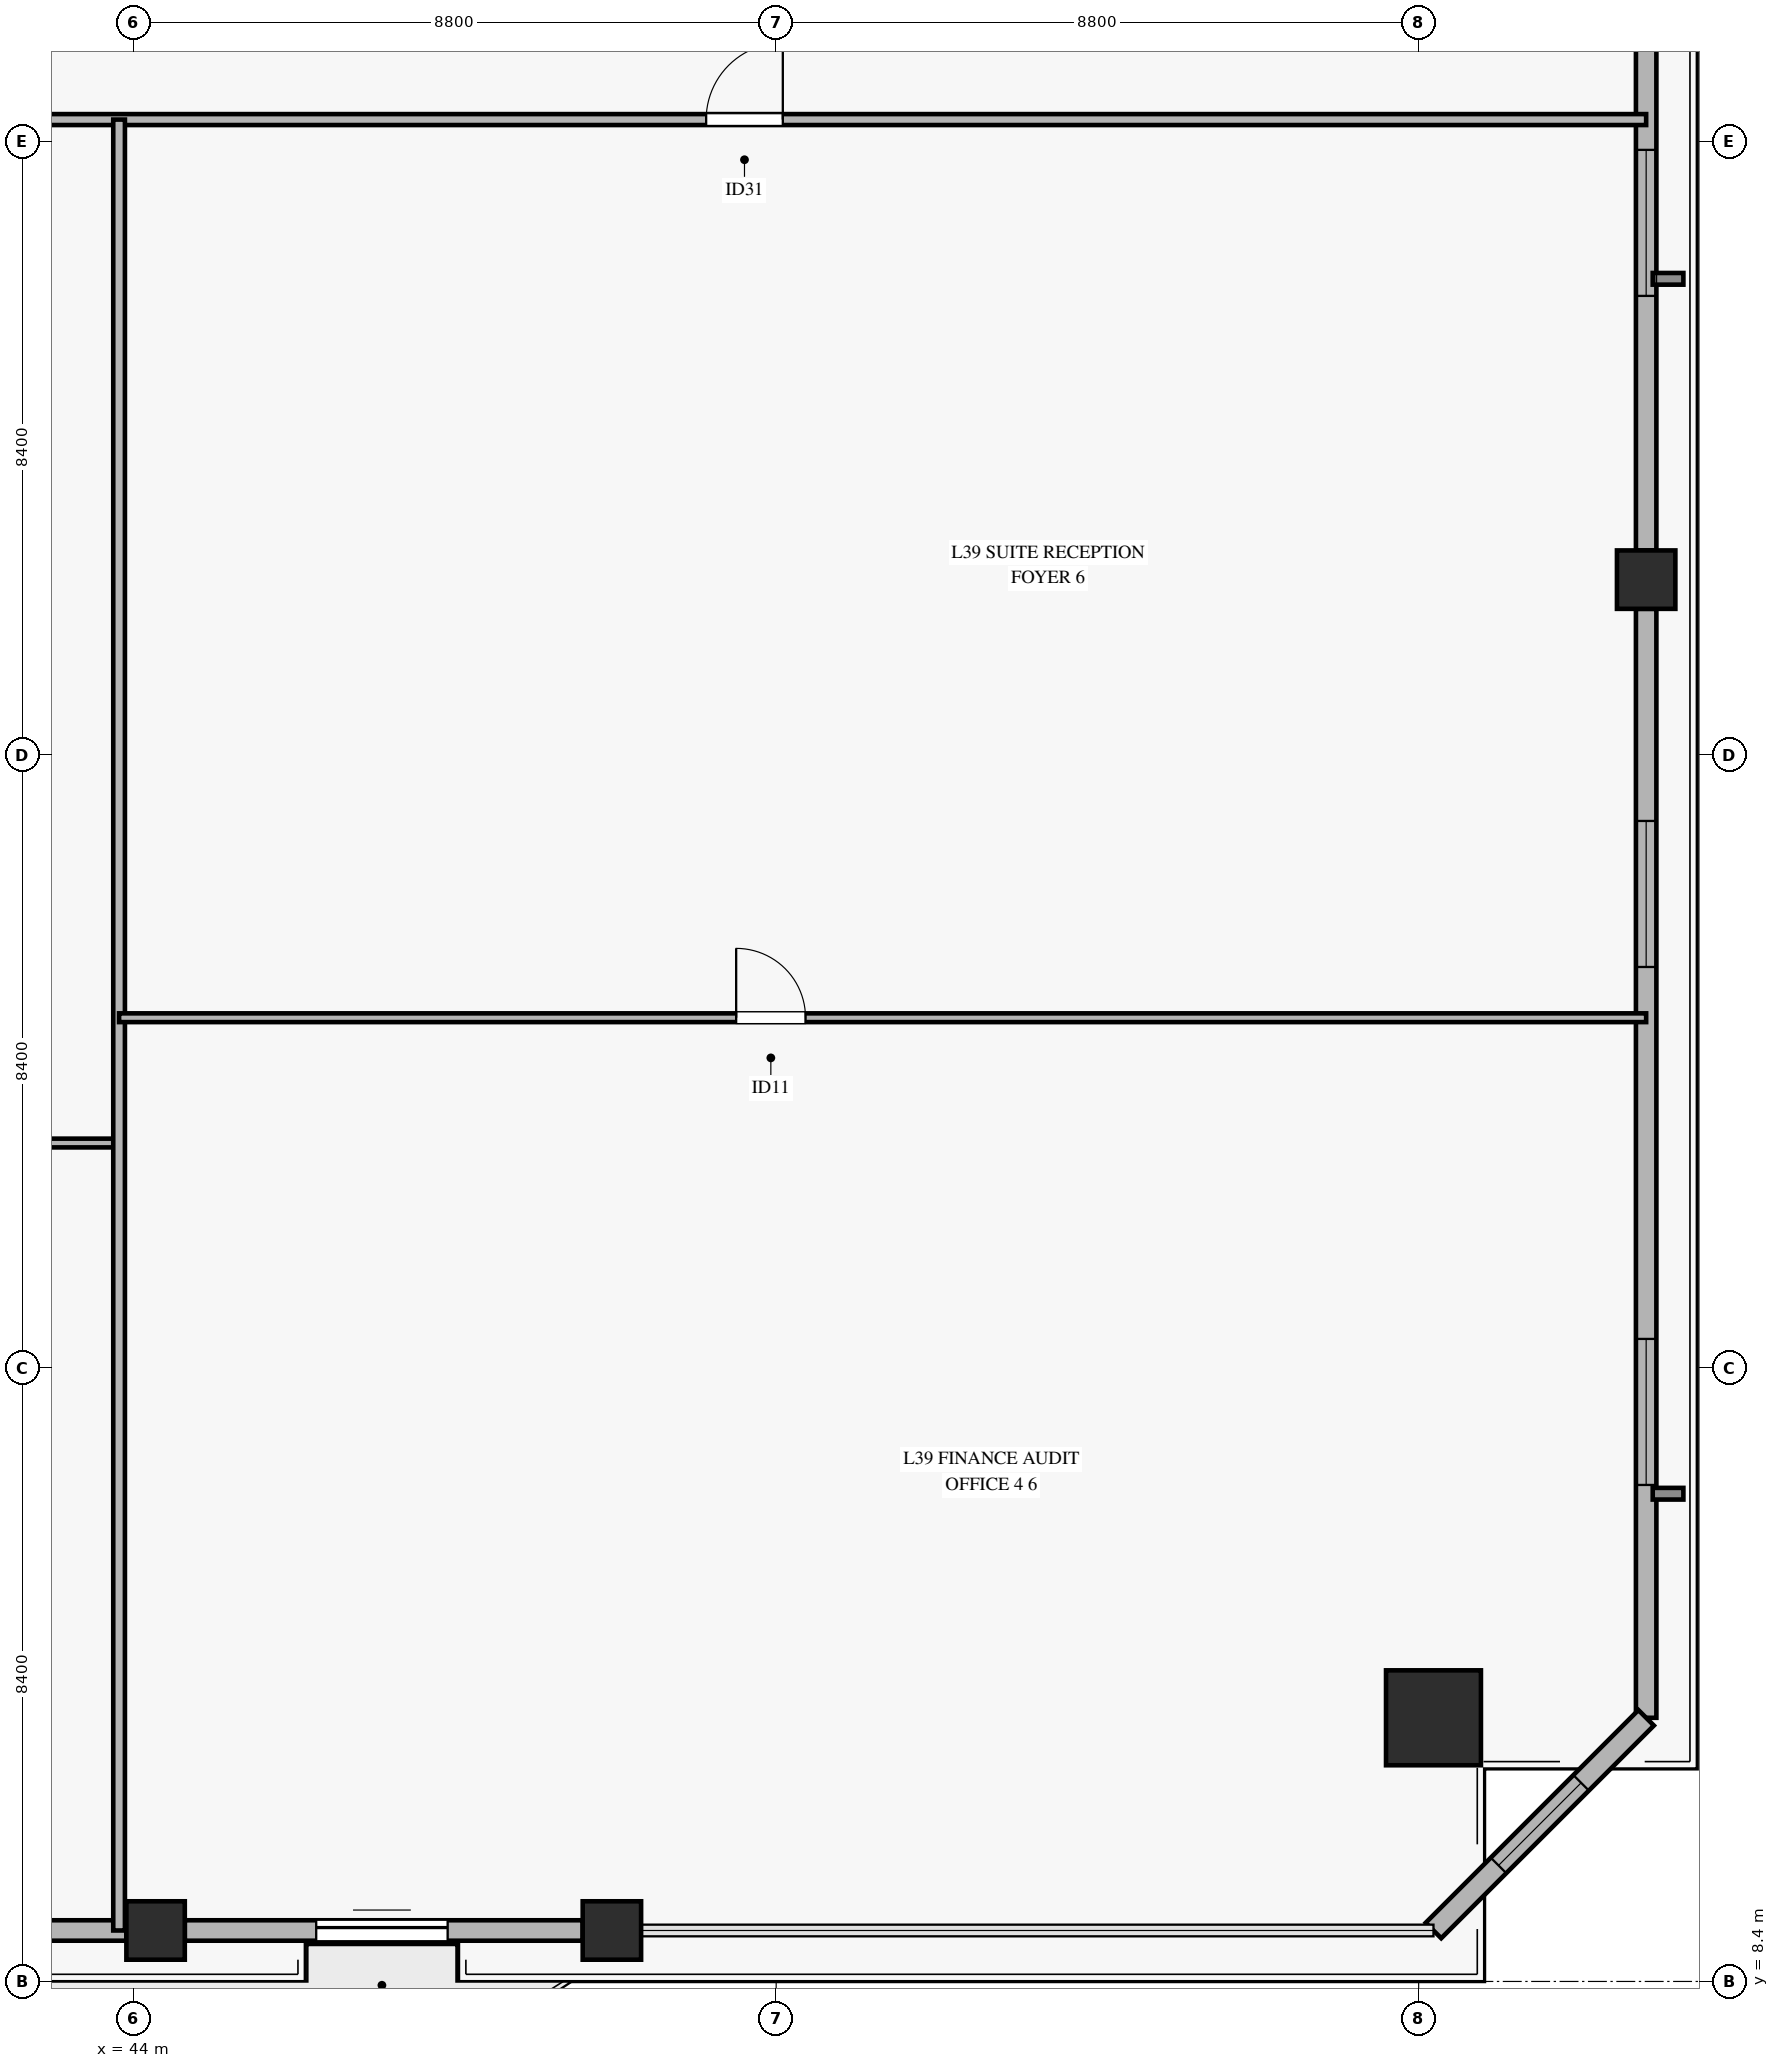
"""IFC4 building model, lengths in metres.
Left out: names, types, materials, properties, quantities, classifications, styles, units other than length and angle.
Written with IfcOpenShell. Run it as: python <this file> out.ifc"""

import sys

from ifc_helpers import new_model, si_unit, direction, frame, frame_2d, origin, origin_2d, place, context, subcontext, project, spatial, rectangle, hollow_rectangle, extrude, source, transform, mapped, element, fill, save


model = new_model("IFC4")
c1 = context("Model", 3, precision=1e-05, world=origin(), true_north=direction((0.0, 1.0)))
c2 = subcontext(c1, "Body", "Model", "MODEL_VIEW")
j1 = project(units=[si_unit("LENGTHUNIT", "METRE"), si_unit("PLANEANGLEUNIT", "RADIAN")], contexts=[c1])
p1 = place(None, origin())
s1 = spatial("IfcSite", under=j1, at=p1, CompositionType="ELEMENT")
p2 = place(p1, origin())
s2 = spatial("IfcBuilding", under=s1, at=p2, CompositionType="ELEMENT")
p3 = place(p2, frame((0.0, 0.0, 159.7)))
s3 = spatial("IfcBuildingStorey", under=s2, at=p3, CompositionType="ELEMENT", Elevation=159.7)
m1 = source(origin(), c2, "Body", "SweptSolid", [
    extrude(hollow_rectangle(XDim=1.3, YDim=1.3, WallThickness=0.06, at=origin_2d()), origin(), (0.0, 0.0, 1.0), 3.27),
])
p4 = place(p3, frame((61.803, 12.011, 0.0), z_axis=(0.0, 0.0, 1.0), x_axis=(1.0, 0.0, 0.0)))
e1 = element("IfcColumn", 1, at=p4, inside=s3, PredefinedType="COLUMN", context=c2, shape_type="MappedRepresentation", body=[
    mapped(m1, transform((0.0, 0.0, 0.0), x_axis=(1.0, 0.0, 0.0), y_axis=(0.0, 1.0, 0.0), z_axis=(0.0, 0.0, 1.0), scale=1.0)),
])
m2 = source(origin(), c2, "Body", "SweptSolid", [
    extrude(hollow_rectangle(XDim=0.8, YDim=0.8, WallThickness=0.036, at=origin_2d()), origin(), (0.0, 0.0, 1.0), 3.27),
])
for number, where, z_axis, x_axis in (
    (2, (44.3, 9.098, 0.0), (0.0, 0.0, 1.0), (1.0, 0.0, 0.0)),
    (3, (50.55, 9.098, 0.0), (0.0, 0.0, 1.0), (1.0, 0.0, 0.0)),
    (4, (64.716, 27.599, 0.0), (0.0, 0.0, 1.0), (1.0, 0.0, 0.0)),
):
    element("IfcColumn", number, at=place(p3, frame(where, z_axis=z_axis, x_axis=x_axis)), inside=s3, PredefinedType="COLUMN", context=c2, shape_type="MappedRepresentation", body=[
        mapped(m2, transform((0.0, 0.0, 0.0), x_axis=(1.0, 0.0, 0.0), y_axis=(0.0, 1.0, 0.0), z_axis=(0.0, 0.0, 1.0), scale=1.0)),
    ])
p5 = place(p3, frame((37.95, 9.098, 0.0), z_axis=(0.0, 0.0, 1.0), x_axis=(1.0, 0.0, 0.0)))
e5 = element("IfcWall", 5, at=p5, inside=s3, PredefinedType="SOLIDWALL", context=c2, shape_type="SweptSolid", body=[
    extrude(rectangle(XDim=5.95, YDim=0.28, at=frame_2d((2.975, 0.0))), origin(), (0.0, 0.0, 1.0), 2.75),
])
p6 = place(p3, frame((44.7, 9.098, 0.0), z_axis=(0.0, 0.0, 1.0), x_axis=(1.0, 0.0, 0.0)))
e6 = element("IfcWall", 6, at=p6, inside=s3, PredefinedType="SOLIDWALL", context=c2, shape_type="SweptSolid", body=[
    extrude(rectangle(XDim=5.45, YDim=0.28, at=frame_2d((2.725, 0.0))), origin(), (0.0, 0.0, 1.0), 2.75),
])
p7 = place(p6, frame((1.8, 0.0, 0.0)))
e7 = element("IfcOpeningElement", 7, at=p7, cuts=e6, PredefinedType="OPENING", context=c2, shape_type="SweptSolid", body=[
    extrude(rectangle(XDim=1.8, YDim=2.25, at=frame_2d((0.9, 1.125))), frame((0.0, 0.15, 0.0), z_axis=(0.0, -1.0, 0.0), x_axis=(1.0, 0.0, 0.0)), (0.0, 0.0, 1.0), 0.3),
])
p8 = place(p3, frame((64.716, 12.011, 0.0), z_axis=(0.0, 0.0, 1.0), x_axis=(0.0, 1.0, 0.0)))
e8 = element("IfcWall", 8, at=p8, inside=s3, PredefinedType="SOLIDWALL", context=c2, shape_type="SweptSolid", body=[
    extrude(rectangle(XDim=15.188, YDim=0.28, at=frame_2d((7.594, 0.0))), origin(), (0.0, 0.0, 1.0), 2.75),
])
p9 = place(p8, frame((3.189, 0.0, 0.45)))
e9 = element("IfcOpeningElement", 9, at=p9, cuts=e8, PredefinedType="OPENING", context=c2, shape_type="SweptSolid", body=[
    extrude(rectangle(XDim=2.0, YDim=2.0, at=frame_2d((1.0, 1.0))), frame((0.0, 0.15, 0.0), z_axis=(0.0, -1.0, 0.0), x_axis=(1.0, 0.0, 0.0)), (0.0, 0.0, 1.0), 0.3),
])
p10 = place(p8, frame((10.283, 0.0, 0.45)))
e10 = element("IfcOpeningElement", 10, at=p10, cuts=e8, PredefinedType="OPENING", context=c2, shape_type="SweptSolid", body=[
    extrude(rectangle(XDim=2.0, YDim=2.0, at=frame_2d((1.0, 1.0))), frame((0.0, 0.15, 0.0), z_axis=(0.0, -1.0, 0.0), x_axis=(1.0, 0.0, 0.0)), (0.0, 0.0, 1.0), 0.3),
])
p11 = place(p3, frame((64.716, 27.999, 0.0), z_axis=(0.0, 0.0, 1.0), x_axis=(0.0, 1.0, 0.0)))
e11 = element("IfcWall", 11, at=p11, inside=s3, PredefinedType="SOLIDWALL", context=c2, shape_type="SweptSolid", body=[
    extrude(rectangle(XDim=15.188, YDim=0.28, at=frame_2d((7.594, 0.0))), origin(), (0.0, 0.0, 1.0), 2.75),
])
p12 = place(p11, frame((3.486, 0.0, 0.45)))
e12 = element("IfcOpeningElement", 12, at=p12, cuts=e11, PredefinedType="OPENING", context=c2, shape_type="SweptSolid", body=[
    extrude(rectangle(XDim=2.0, YDim=2.0, at=frame_2d((1.0, 1.0))), frame((0.0, 0.15, 0.0), z_axis=(0.0, -1.0, 0.0), x_axis=(1.0, 0.0, 0.0)), (0.0, 0.0, 1.0), 0.3),
])
p13 = place(p3, frame((61.803, 9.098, 0.0), z_axis=(0.0, 0.0, 1.0), x_axis=(0.707106781187, 0.707106781187, 0.0)))
e13 = element("IfcWall", 13, at=p13, inside=s3, PredefinedType="SOLIDWALL", context=c2, shape_type="SweptSolid", body=[
    extrude(rectangle(XDim=4.12, YDim=0.3, at=frame_2d((2.06, 0.0))), origin(), (0.0, 0.0, 1.0), 2.75),
])
p14 = place(p13, frame((1.26, 0.0, 0.45)))
e14 = element("IfcOpeningElement", 14, at=p14, cuts=e13, PredefinedType="OPENING", context=c2, shape_type="SweptSolid", body=[
    extrude(rectangle(XDim=1.6, YDim=2.0, at=frame_2d((0.8, 1.0))), frame((0.0, 0.16, 0.0), z_axis=(0.0, -1.0, 0.0), x_axis=(1.0, 0.0, 0.0)), (0.0, 0.0, 1.0), 0.32),
])
p15 = place(p3, frame((5.684, 33.9, 0.0), z_axis=(0.0, 0.0, 1.0), x_axis=(1.0, 0.0, 0.0)))
e15 = element("IfcWall", 15, at=p15, inside=s3, PredefinedType="PARTITIONING", context=c2, shape_type="SweptSolid", body=[
    extrude(rectangle(XDim=59.032, YDim=0.15, at=frame_2d((29.516, 0.0))), origin(), (0.0, 0.0, 1.0), 2.455),
])
p16 = place(p15, frame((6.265, 0.0, 0.0)))
e16 = element("IfcOpeningElement", 16, at=p16, cuts=e15, PredefinedType="OPENING", context=c2, shape_type="SweptSolid", body=[
    extrude(rectangle(XDim=1.05, YDim=2.15, at=frame_2d((0.525, 1.075))), frame((0.0, 0.085, 0.0), z_axis=(0.0, -1.0, 0.0), x_axis=(1.0, 0.0, 0.0)), (0.0, 0.0, 1.0), 0.17),
])
p17 = place(p15, frame((18.469, 0.0, 0.0)))
e17 = element("IfcOpeningElement", 17, at=p17, cuts=e15, PredefinedType="OPENING", context=c2, shape_type="SweptSolid", body=[
    extrude(rectangle(XDim=1.05, YDim=2.15, at=frame_2d((0.525, 1.075))), frame((0.0, 0.085, 0.0), z_axis=(0.0, -1.0, 0.0), x_axis=(1.0, 0.0, 0.0)), (0.0, 0.0, 1.0), 0.17),
])
p18 = place(p15, frame((24.661, 0.0, 0.0)))
e18 = element("IfcOpeningElement", 18, at=p18, cuts=e15, PredefinedType="OPENING", context=c2, shape_type="SweptSolid", body=[
    extrude(rectangle(XDim=1.05, YDim=2.15, at=frame_2d((0.525, 1.075))), frame((0.0, 0.085, 0.0), z_axis=(0.0, -1.0, 0.0), x_axis=(1.0, 0.0, 0.0)), (0.0, 0.0, 1.0), 0.17),
])
p19 = place(p15, frame((30.152, 0.0, 0.0)))
e19 = element("IfcOpeningElement", 19, at=p19, cuts=e15, PredefinedType="OPENING", context=c2, shape_type="SweptSolid", body=[
    extrude(rectangle(XDim=1.05, YDim=2.15, at=frame_2d((0.525, 1.075))), frame((0.0, 0.085, 0.0), z_axis=(0.0, -1.0, 0.0), x_axis=(1.0, 0.0, 0.0)), (0.0, 0.0, 1.0), 0.17),
])
p20 = place(p15, frame((35.352, 0.0, 0.0)))
e20 = element("IfcOpeningElement", 20, at=p20, cuts=e15, PredefinedType="OPENING", context=c2, shape_type="SweptSolid", body=[
    extrude(rectangle(XDim=1.05, YDim=2.15, at=frame_2d((0.525, 1.075))), frame((0.0, 0.085, 0.0), z_axis=(0.0, -1.0, 0.0), x_axis=(1.0, 0.0, 0.0)), (0.0, 0.0, 1.0), 0.17),
])
p21 = place(p15, frame((46.157, 0.0, 0.0)))
e21 = element("IfcOpeningElement", 21, at=p21, cuts=e15, PredefinedType="OPENING", context=c2, shape_type="SweptSolid", body=[
    extrude(rectangle(XDim=1.05, YDim=2.15, at=frame_2d((0.525, 1.075))), frame((0.0, 0.085, 0.0), z_axis=(0.0, -1.0, 0.0), x_axis=(1.0, 0.0, 0.0)), (0.0, 0.0, 1.0), 0.17),
])
p22 = place(p3, frame((38.6, 19.883, 0.0), z_axis=(0.0, 0.0, 1.0), x_axis=(1.0, 0.0, 0.0)))
e22 = element("IfcWall", 22, at=p22, inside=s3, PredefinedType="PARTITIONING", context=c2, shape_type="SweptSolid", body=[
    extrude(rectangle(XDim=5.2, YDim=0.12, at=frame_2d((2.6, 0.0))), origin(), (0.0, 0.0, 1.0), 3.27),
])
p23 = place(p22, frame((2.325, 0.0, 0.0)))
e23 = element("IfcOpeningElement", 23, at=p23, cuts=e22, PredefinedType="OPENING", context=c2, shape_type="SweptSolid", body=[
    extrude(rectangle(XDim=0.95, YDim=2.1, at=frame_2d((0.475, 1.05))), frame((0.0, 0.07, 0.0), z_axis=(0.0, -1.0, 0.0), x_axis=(1.0, 0.0, 0.0)), (0.0, 0.0, 1.0), 0.14),
])
p24 = place(p3, frame((43.8, 9.098, 0.0), z_axis=(0.0, 0.0, 1.0), x_axis=(0.0, 1.0, 0.0)))
e24 = element("IfcWall", 24, at=p24, inside=s3, PredefinedType="PARTITIONING", context=c2, shape_type="SweptSolid", body=[
    extrude(rectangle(XDim=24.802, YDim=0.16, at=frame_2d((12.401, 0.0))), origin(), (0.0, 0.0, 1.0), 2.755),
])
p25 = place(p3, frame((43.8, 21.599, 0.0), z_axis=(0.0, 0.0, 1.0), x_axis=(1.0, 0.0, 0.0)))
e25 = element("IfcWall", 25, at=p25, inside=s3, PredefinedType="PARTITIONING", context=c2, shape_type="SweptSolid", body=[
    extrude(rectangle(XDim=20.916, YDim=0.12, at=frame_2d((10.458, 0.0))), origin(), (0.0, 0.0, 1.0), 2.455),
])
p26 = place(p25, frame((8.452, 0.0, 0.0)))
e26 = element("IfcOpeningElement", 26, at=p26, cuts=e25, PredefinedType="OPENING", context=c2, shape_type="SweptSolid", body=[
    extrude(rectangle(XDim=0.95, YDim=2.1, at=frame_2d((0.475, 1.05))), frame((0.0, 0.07, 0.0), z_axis=(0.0, -1.0, 0.0), x_axis=(1.0, 0.0, 0.0)), (0.0, 0.0, 1.0), 0.14),
])
m3 = source(origin(), c2, "Body", "SweptSolid", [
    extrude(rectangle(XDim=1.8, YDim=2.25, at=frame_2d((0.9, 1.125))), frame((0.0, 0.025, 0.0), z_axis=(0.0, -1.0, 0.0), x_axis=(1.0, 0.0, 0.0)), (0.0, 0.0, 1.0), 0.05),
])
p27 = place(p7, origin())
e27 = element("IfcDoor", 27, at=p27, inside=s3, OperationType="SLIDING_TO_LEFT", PredefinedType="DOOR", context=c2, shape_type="MappedRepresentation", body=[
    mapped(m3, transform((0.0, 0.0, 0.0), x_axis=(1.0, 0.0, 0.0), y_axis=(0.0, 1.0, 0.0), z_axis=(0.0, 0.0, 1.0), scale=1.0)),
])
fill(e7, e27)
m4 = source(origin(), c2, "Body", "SweptSolid", [
    extrude(rectangle(XDim=2.0, YDim=2.0, at=frame_2d((1.0, 1.0))), frame((0.0, 0.03, 0.0), z_axis=(0.0, -1.0, 0.0), x_axis=(1.0, 0.0, 0.0)), (0.0, 0.0, 1.0), 0.06),
])
p28 = place(p9, origin())
e28 = element("IfcWindow", 28, at=p28, inside=s3, PartitioningType="SINGLE_PANEL", PredefinedType="WINDOW", context=c2, shape_type="MappedRepresentation", body=[
    mapped(m4, transform((0.0, 0.0, 0.0), x_axis=(1.0, 0.0, 0.0), y_axis=(0.0, 1.0, 0.0), z_axis=(0.0, 0.0, 1.0), scale=1.0)),
])
fill(e9, e28)
p29 = place(p10, origin())
e29 = element("IfcWindow", 29, at=p29, inside=s3, PartitioningType="SINGLE_PANEL", PredefinedType="WINDOW", context=c2, shape_type="MappedRepresentation", body=[
    mapped(m4, transform((0.0, 0.0, 0.0), x_axis=(1.0, 0.0, 0.0), y_axis=(0.0, 1.0, 0.0), z_axis=(0.0, 0.0, 1.0), scale=1.0)),
])
fill(e10, e29)
p30 = place(p12, origin())
e30 = element("IfcWindow", 30, at=p30, inside=s3, PartitioningType="SINGLE_PANEL", PredefinedType="WINDOW", context=c2, shape_type="MappedRepresentation", body=[
    mapped(m4, transform((0.0, 0.0, 0.0), x_axis=(1.0, 0.0, 0.0), y_axis=(0.0, 1.0, 0.0), z_axis=(0.0, 0.0, 1.0), scale=1.0)),
])
fill(e12, e30)
m5 = source(origin(), c2, "Body", "SweptSolid", [
    extrude(rectangle(XDim=1.6, YDim=2.0, at=frame_2d((0.8, 1.0))), frame((0.0, 0.03, 0.0), z_axis=(0.0, -1.0, 0.0), x_axis=(1.0, 0.0, 0.0)), (0.0, 0.0, 1.0), 0.06),
])
p31 = place(p14, origin())
e31 = element("IfcWindow", 31, at=p31, inside=s3, PartitioningType="SINGLE_PANEL", PredefinedType="WINDOW", context=c2, shape_type="MappedRepresentation", body=[
    mapped(m5, transform((0.0, 0.0, 0.0), x_axis=(1.0, 0.0, 0.0), y_axis=(0.0, 1.0, 0.0), z_axis=(0.0, 0.0, 1.0), scale=1.0)),
])
fill(e14, e31)
m6 = source(origin(), c2, "Body", "SweptSolid", [
    extrude(rectangle(XDim=1.05, YDim=2.15, at=frame_2d((0.525, 1.075))), frame((0.0, 0.025, 0.0), z_axis=(0.0, -1.0, 0.0), x_axis=(1.0, 0.0, 0.0)), (0.0, 0.0, 1.0), 0.05),
])
p32 = place(p21, origin())
e32 = element("IfcDoor", 32, at=p32, inside=s3, OperationType="SINGLE_SWING_RIGHT", PredefinedType="DOOR", context=c2, shape_type="MappedRepresentation", body=[
    mapped(m6, transform((0.0, 0.0, 0.0), x_axis=(1.0, 0.0, 0.0), y_axis=(0.0, 1.0, 0.0), z_axis=(0.0, 0.0, 1.0), scale=1.0)),
])
fill(e21, e32)
m7 = source(origin(), c2, "Body", "SweptSolid", [
    extrude(rectangle(XDim=0.95, YDim=2.1, at=frame_2d((0.475, 1.05))), frame((0.0, 0.025, 0.0), z_axis=(0.0, -1.0, 0.0), x_axis=(1.0, 0.0, 0.0)), (0.0, 0.0, 1.0), 0.05),
])
p33 = place(p26, origin())
e33 = element("IfcDoor", 33, at=p33, inside=s3, OperationType="SINGLE_SWING_LEFT", PredefinedType="DOOR", context=c2, shape_type="MappedRepresentation", body=[
    mapped(m7, transform((0.0, 0.0, 0.0), x_axis=(1.0, 0.0, 0.0), y_axis=(0.0, 1.0, 0.0), z_axis=(0.0, 0.0, 1.0), scale=1.0)),
])
fill(e26, e33)
save(model, sys.argv[1])
